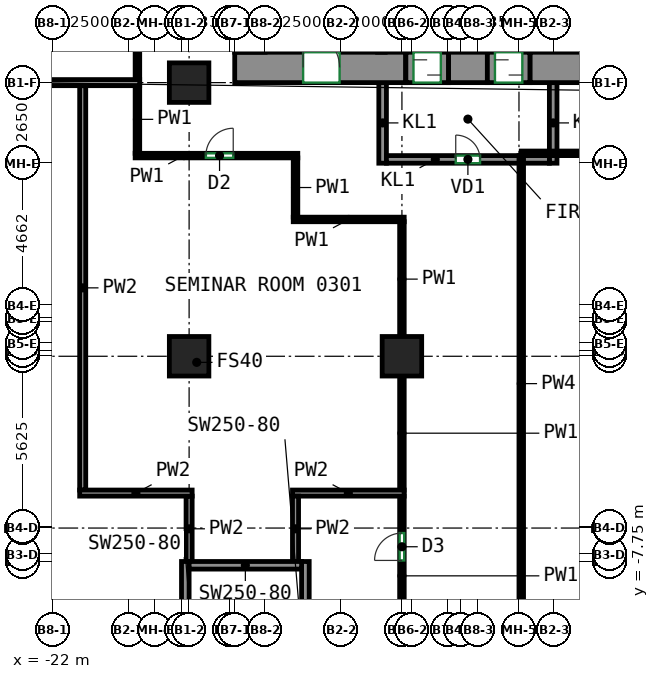
"""IFC4 building model, lengths in metres.
Left out: names, types, materials, properties, quantities, classifications, styles, units other than length and angle.
Written with IfcOpenShell. Run it as: python <this file> out.ifc"""

import sys

from ifc_helpers import new_model, si_unit, direction, frame, frame_2d, origin, origin_2d, place, context, subcontext, project, spatial, rectangle, extrude, source, transform, mapped, element, fill, save


model = new_model("IFC4")
c1 = context("Model", 3, precision=1e-05, world=origin(), true_north=direction((0.0, 1.0)))
c2 = subcontext(c1, "Body", "Model", "MODEL_VIEW")
j1 = project(units=[si_unit("LENGTHUNIT", "METRE"), si_unit("PLANEANGLEUNIT", "RADIAN")], contexts=[c1])
p1 = place(None, origin())
s1 = spatial("IfcSite", under=j1, at=p1, CompositionType="ELEMENT")
p2 = place(p1, origin())
s2 = spatial("IfcBuilding", under=s1, at=p2, CompositionType="ELEMENT")
p3 = place(p2, frame((0.0, 0.0, 18.0)))
s3 = spatial("IfcBuildingStorey", under=s2, at=p3, CompositionType="ELEMENT", Elevation=18.0)
m1 = source(origin(), c2, "Body", "SweptSolid", [
    extrude(rectangle(XDim=1.3, YDim=1.3, at=origin_2d()), origin(), (0.0, 0.0, 1.0), 4.1),
])
for number, where, z_axis, x_axis in (
    (1, (-17.5, -1.0, 0.0), (0.0, 0.0, 1.0), (1.0, 0.0, 0.0)),
    (2, (-17.5, 8.0, 0.0), (0.0, 0.0, 1.0), (1.0, 0.0, 0.0)),
    (3, (-10.5, -1.0, 0.0), (0.0, 0.0, 1.0), (1.0, 0.0, 0.0)),
):
    element("IfcColumn", number, at=place(p3, frame(where, z_axis=z_axis, x_axis=x_axis)), inside=s3, PredefinedType="COLUMN", context=c2, shape_type="MappedRepresentation", body=[
        mapped(m1, transform((0.0, 0.0, 0.0))),
    ])
m2 = source(origin(), c2, "Body", "SweptSolid", [
    extrude(rectangle(XDim=5.63, YDim=1.0, at=frame_2d((2.815, 0.0))), origin(), (0.0, 0.0, 1.0), 4.1),
])
p4 = place(p3, frame((-16.0, 8.5, 0.0), z_axis=(0.0, 0.0, 1.0), x_axis=(1.0, 0.0, 0.0)))
e4 = element("IfcWall", 4, at=p4, inside=s3, PredefinedType="SHEAR", context=c2, shape_type="MappedRepresentation", body=[
    mapped(m2, transform((0.0, 0.0, 0.0))),
])
p5 = place(p4, frame((2.25, 0.0, 0.0)))
e5 = element("IfcOpeningElement", 5, at=p5, cuts=e4, PredefinedType="OPENING", context=c2, shape_type="SweptSolid", body=[
    extrude(rectangle(XDim=1.2, YDim=2.1, at=frame_2d((0.6, 1.05))), frame((0.0, 0.51, 0.0), z_axis=(0.0, -1.0, 0.0), x_axis=(1.0, 0.0, 0.0)), (0.0, 0.0, 1.0), 1.02),
])
m3 = source(origin(), c2, "Body", "SweptSolid", [
    extrude(rectangle(XDim=1.28, YDim=1.0, at=frame_2d((0.64, 0.0))), origin(), (0.0, 0.0, 1.0), 4.1),
])
p6 = place(p3, frame((-8.97, 8.5, 0.0), z_axis=(0.0, 0.0, 1.0), x_axis=(1.0, 0.0, 0.0)))
e6 = element("IfcWall", 6, at=p6, inside=s3, PredefinedType="SHEAR", context=c2, shape_type="MappedRepresentation", body=[
    mapped(m3, transform((0.0, 0.0, 0.0))),
])
m4 = source(origin(), c2, "Body", "SweptSolid", [
    extrude(rectangle(XDim=14.18, YDim=1.0, at=frame_2d((7.09, 0.0))), origin(), (0.0, 0.0, 1.0), 4.1),
])
p7 = place(p3, frame((-6.29, 8.5, 0.0), z_axis=(0.0, 0.0, 1.0), x_axis=(1.0, 0.0, 0.0)))
e7 = element("IfcWall", 7, at=p7, inside=s3, PredefinedType="SHEAR", context=c2, shape_type="MappedRepresentation", body=[
    mapped(m4, transform((0.0, 0.0, 0.0))),
])
m5 = source(origin(), c2, "Body", "SweptSolid", [
    extrude(rectangle(XDim=8.0, YDim=0.25, at=frame_2d((4.0, 0.0))), origin(), (0.0, 0.0, 1.0), 4.1),
])
for number, where, z_axis, x_axis in (
    (8, (-17.625, -15.75, 0.0), (0.0, 0.0, 1.0), (0.0, 1.0, 0.0)),
    (9, (-13.675, -15.75, 0.0), (0.0, 0.0, 1.0), (0.0, 1.0, 0.0)),
):
    element("IfcWall", number, at=place(p3, frame(where, z_axis=z_axis, x_axis=x_axis)), inside=s3, PredefinedType="SHEAR", context=c2, shape_type="MappedRepresentation", body=[
        mapped(m5, transform((0.0, 0.0, 0.0))),
    ])
m6 = source(origin(), c2, "Body", "SweptSolid", [
    extrude(rectangle(XDim=3.7, YDim=0.25, at=frame_2d((1.85, 0.0))), origin(), (0.0, 0.0, 1.0), 4.1),
])
p8 = place(p3, frame((-17.5, -7.875, 0.0), z_axis=(0.0, 0.0, 1.0), x_axis=(1.0, 0.0, 0.0)))
e10 = element("IfcWall", 10, at=p8, inside=s3, PredefinedType="SHEAR", context=c2, shape_type="MappedRepresentation", body=[
    mapped(m6, transform((0.0, 0.0, 0.0))),
])
m7 = source(origin(), c2, "Body", "SweptSolid", [
    extrude(rectangle(XDim=1.4, YDim=1.0, at=frame_2d((0.7, 0.0))), origin(), (0.0, 0.0, 1.0), 0.2),
])
p9 = place(p3, frame((-10.37, 8.5, 3.9), z_axis=(0.0, 0.0, 1.0), x_axis=(1.0, 0.0, 0.0)))
e11 = element("IfcWall", 11, at=p9, inside=s3, PredefinedType="SHEAR", context=c2, shape_type="MappedRepresentation", body=[
    mapped(m7, transform((0.0, 0.0, 0.0))),
])
m8 = source(origin(), c2, "Body", "SweptSolid", [
    extrude(rectangle(XDim=2.65, YDim=0.25, at=frame_2d((1.325, 0.0))), origin(), (0.0, 0.0, 1.0), 4.1),
])
for number, where, z_axis, x_axis in (
    (12, (-11.135, 5.35, 0.0), (0.0, 0.0, 1.0), (0.0, 1.0, 0.0)),
    (13, (-5.525, 5.35, 0.0), (0.0, 0.0, 1.0), (0.0, 1.0, 0.0)),
):
    element("IfcWall", number, at=place(p3, frame(where, z_axis=z_axis, x_axis=x_axis)), inside=s3, PredefinedType="PARTITIONING", context=c2, shape_type="MappedRepresentation", body=[
        mapped(m8, transform((0.0, 0.0, 0.0))),
    ])
m9 = source(origin(), c2, "Body", "SweptSolid", [
    extrude(rectangle(XDim=5.36, YDim=0.25, at=frame_2d((2.68, 0.0))), origin(), (0.0, 0.0, 1.0), 4.1),
])
p10 = place(p3, frame((-11.01, 5.475, 0.0), z_axis=(0.0, 0.0, 1.0), x_axis=(1.0, 0.0, 0.0)))
e14 = element("IfcWall", 14, at=p10, inside=s3, PredefinedType="PARTITIONING", context=c2, shape_type="MappedRepresentation", body=[
    mapped(m9, transform((0.0, 0.0, 0.0))),
])
p11 = place(p10, frame((2.28, 0.0, 0.0)))
e15 = element("IfcOpeningElement", 15, at=p11, cuts=e14, PredefinedType="OPENING", context=c2, shape_type="SweptSolid", body=[
    extrude(rectangle(XDim=0.8, YDim=2.0, at=frame_2d((0.4, 1.0))), frame((0.0, 0.135, 0.0), z_axis=(0.0, -1.0, 0.0), x_axis=(1.0, 0.0, 0.0)), (0.0, 0.0, 1.0), 0.27),
])
m10 = source(origin(), c2, "Body", "SweptSolid", [
    extrude(rectangle(XDim=1.4, YDim=1.0, at=frame_2d((0.7, 0.0))), origin(), (0.0, 0.0, 1.0), 2.7),
])
p12 = place(p3, frame((-10.37, 8.5, 0.0), z_axis=(0.0, 0.0, 1.0), x_axis=(1.0, 0.0, 0.0)))
e16 = element("IfcWall", 16, at=p12, inside=s3, PredefinedType="PARTITIONING", context=c2, shape_type="MappedRepresentation", body=[
    mapped(m10, transform((0.0, 0.0, 0.0))),
])
p13 = place(p12, frame((0.25, 0.0, 0.0)))
e17 = element("IfcOpeningElement", 17, at=p13, cuts=e16, PredefinedType="OPENING", context=c2, shape_type="SweptSolid", body=[
    extrude(rectangle(XDim=0.9, YDim=2.1, at=frame_2d((0.45, 1.05))), frame((0.0, 0.51, 0.0), z_axis=(0.0, -1.0, 0.0), x_axis=(1.0, 0.0, 0.0)), (0.0, 0.0, 1.0), 1.02),
])
m11 = source(origin(), c2, "Body", "SweptSolid", [
    extrude(rectangle(XDim=1.4, YDim=1.0, at=frame_2d((0.7, 0.0))), origin(), (0.0, 0.0, 1.0), 2.7),
])
p14 = place(p3, frame((-7.69, 8.5, 0.0), z_axis=(0.0, 0.0, 1.0), x_axis=(1.0, 0.0, 0.0)))
e18 = element("IfcWall", 18, at=p14, inside=s3, PredefinedType="PARTITIONING", context=c2, shape_type="MappedRepresentation", body=[
    mapped(m11, transform((0.0, 0.0, 0.0))),
])
p15 = place(p14, frame((0.25, 0.0, 0.0)))
e19 = element("IfcOpeningElement", 19, at=p15, cuts=e18, PredefinedType="OPENING", context=c2, shape_type="SweptSolid", body=[
    extrude(rectangle(XDim=0.9, YDim=2.1, at=frame_2d((0.45, 1.05))), frame((0.0, 0.51, 0.0), z_axis=(0.0, -1.0, 0.0), x_axis=(1.0, 0.0, 0.0)), (0.0, 0.0, 1.0), 1.02),
])
p16 = place(p3, frame((-10.5, -5.41, 0.0), z_axis=(0.0, 0.0, 1.0), x_axis=(0.0, 1.0, 0.0)))
e20 = element("IfcWall", 20, at=p16, inside=s3, PredefinedType="PARTITIONING", context=c2, shape_type="SweptSolid", body=[
    extrude(rectangle(XDim=3.76, YDim=0.15, at=frame_2d((1.88, 0.0))), origin(), (0.0, 0.0, 1.0), 3.45),
])
p17 = place(p3, frame((-10.5, -0.35, 0.0), z_axis=(0.0, 0.0, 1.0), x_axis=(0.0, 1.0, 0.0)))
e21 = element("IfcWall", 21, at=p17, inside=s3, PredefinedType="PARTITIONING", context=c2, shape_type="SweptSolid", body=[
    extrude(rectangle(XDim=3.775, YDim=0.15, at=frame_2d((1.888, 0.0))), origin(), (0.0, 0.0, 1.0), 4.1),
])
p18 = place(p3, frame((-14.075, 3.5, 0.0), z_axis=(0.0, 0.0, 1.0), x_axis=(1.0, 0.0, 0.0)))
e22 = element("IfcWall", 22, at=p18, inside=s3, PredefinedType="PARTITIONING", context=c2, shape_type="SweptSolid", body=[
    extrude(rectangle(XDim=3.65, YDim=0.15, at=frame_2d((1.825, 0.0))), origin(), (0.0, 0.0, 1.0), 4.1),
])
p19 = place(p3, frame((-14.0, 5.525, 0.0), z_axis=(0.0, 0.0, 1.0), x_axis=(0.0, -1.0, 0.0)))
e23 = element("IfcWall", 23, at=p19, inside=s3, PredefinedType="PARTITIONING", context=c2, shape_type="SweptSolid", body=[
    extrude(rectangle(XDim=1.95, YDim=0.15, at=frame_2d((0.975, 0.0))), origin(), (0.0, 0.0, 1.0), 4.1),
])
p20 = place(p3, frame((-19.275, 5.6, 0.0), z_axis=(0.0, 0.0, 1.0), x_axis=(1.0, 0.0, 0.0)))
e24 = element("IfcWall", 24, at=p20, inside=s3, PredefinedType="PARTITIONING", context=c2, shape_type="SweptSolid", body=[
    extrude(rectangle(XDim=5.35, YDim=0.15, at=frame_2d((2.675, 0.0))), origin(), (0.0, 0.0, 1.0), 4.1),
])
p21 = place(p20, frame((2.326, 0.0, 0.0)))
e25 = element("IfcOpeningElement", 25, at=p21, cuts=e24, PredefinedType="OPENING", context=c2, shape_type="SweptSolid", body=[
    extrude(rectangle(XDim=0.9, YDim=2.1, at=frame_2d((0.45, 1.05))), frame((0.0, 0.085, 0.0), z_axis=(0.0, -1.0, 0.0), x_axis=(1.0, 0.0, 0.0)), (0.0, 0.0, 1.0), 0.17),
])
p22 = place(p3, frame((-19.2, 5.675, 0.0), z_axis=(0.0, 0.0, 1.0), x_axis=(0.0, 1.0, 0.0)))
e26 = element("IfcWall", 26, at=p22, inside=s3, PredefinedType="PARTITIONING", context=c2, shape_type="SweptSolid", body=[
    extrude(rectangle(XDim=2.235, YDim=0.15, at=frame_2d((1.117, 0.0))), origin(), (0.0, 0.0, 1.0), 4.1),
])
p23 = place(p3, frame((-10.5, -9.35, 0.0), z_axis=(0.0, 0.0, 1.0), x_axis=(0.0, 1.0, 0.0)))
e27 = element("IfcWall", 27, at=p23, inside=s3, PredefinedType="PARTITIONING", context=c2, shape_type="SweptSolid", body=[
    extrude(rectangle(XDim=3.76, YDim=0.15, at=frame_2d((1.88, 0.0))), origin(), (0.0, 0.0, 1.0), 3.45),
])
p24 = place(p23, frame((1.635, 0.0, 0.0)))
e28 = element("IfcOpeningElement", 28, at=p24, cuts=e27, PredefinedType="OPENING", context=c2, shape_type="SweptSolid", body=[
    extrude(rectangle(XDim=0.9, YDim=2.1, at=frame_2d((0.45, 1.05))), frame((0.0, 0.085, 0.0), z_axis=(0.0, -1.0, 0.0), x_axis=(1.0, 0.0, 0.0)), (0.0, 0.0, 1.0), 0.17),
])
p25 = place(p3, frame((-19.2, 8.09, 0.0), z_axis=(0.0, 0.0, 1.0), x_axis=(0.0, 1.0, 0.0)))
e29 = element("IfcWall", 29, at=p25, inside=s3, PredefinedType="PARTITIONING", context=c2, shape_type="SweptSolid", body=[
    extrude(rectangle(XDim=16.335, YDim=0.15, at=frame_2d((8.167, 0.0))), origin(), (0.0, 0.0, 1.0), 4.1),
])
p26 = place(p25, frame((8.72, 0.0, 0.0)))
e30 = element("IfcOpeningElement", 30, at=p26, cuts=e29, PredefinedType="OPENING", context=c2, shape_type="SweptSolid", body=[
    extrude(rectangle(XDim=0.9, YDim=2.1, at=frame_2d((0.45, 1.05))), frame((0.0, 0.085, 0.0), z_axis=(0.0, -1.0, 0.0), x_axis=(1.0, 0.0, 0.0)), (0.0, 0.0, 1.0), 0.17),
])
p27 = place(p3, frame((-21.0, 7.9, 0.0), z_axis=(0.0, 0.0, 1.0), x_axis=(0.0, -1.0, 0.0)))
e31 = element("IfcWall", 31, at=p27, inside=s3, PredefinedType="PARTITIONING", context=c2, shape_type="SweptSolid", body=[
    extrude(rectangle(XDim=13.3, YDim=0.2, at=frame_2d((6.65, 0.0))), origin(), (0.0, 0.0, 1.0), 4.1),
])
p28 = place(p3, frame((-17.5, -7.75, 0.0), z_axis=(0.0, 0.0, 1.0), x_axis=(0.0, 1.0, 0.0)))
e32 = element("IfcWall", 32, at=p28, inside=s3, PredefinedType="PARTITIONING", context=c2, shape_type="SweptSolid", body=[
    extrude(rectangle(XDim=2.15, YDim=0.2, at=frame_2d((1.075, 0.0))), origin(), (0.0, 0.0, 1.0), 4.1),
])
p29 = place(p3, frame((-21.1, -5.5, 0.0), z_axis=(0.0, 0.0, 1.0), x_axis=(1.0, 0.0, 0.0)))
e33 = element("IfcWall", 33, at=p29, inside=s3, PredefinedType="PARTITIONING", context=c2, shape_type="SweptSolid", body=[
    extrude(rectangle(XDim=3.7, YDim=0.2, at=frame_2d((1.85, 0.0))), origin(), (0.0, 0.0, 1.0), 4.1),
])
p30 = place(p3, frame((-14.1, -5.5, 0.0), z_axis=(0.0, 0.0, 1.0), x_axis=(1.0, 0.0, 0.0)))
e34 = element("IfcWall", 34, at=p30, inside=s3, PredefinedType="PARTITIONING", context=c2, shape_type="SweptSolid", body=[
    extrude(rectangle(XDim=3.674, YDim=0.2, at=frame_2d((1.837, 0.0))), origin(), (0.0, 0.0, 1.0), 4.1),
])
p31 = place(p3, frame((-14.0, -7.75, 0.0), z_axis=(0.0, 0.0, 1.0), x_axis=(0.0, 1.0, 0.0)))
e35 = element("IfcWall", 35, at=p31, inside=s3, PredefinedType="PARTITIONING", context=c2, shape_type="SweptSolid", body=[
    extrude(rectangle(XDim=2.15, YDim=0.2, at=frame_2d((1.075, 0.0))), origin(), (0.0, 0.0, 1.0), 4.1),
])
p32 = place(p3, frame((-27.1, 8.0, 0.0), z_axis=(0.0, 0.0, 1.0), x_axis=(1.0, 0.0, 0.0)))
e36 = element("IfcWall", 36, at=p32, inside=s3, PredefinedType="PARTITIONING", context=c2, shape_type="SweptSolid", body=[
    extrude(rectangle(XDim=7.974, YDim=0.2, at=frame_2d((3.987, 0.0))), origin(), (0.0, 0.0, 1.0), 3.45),
])
p33 = place(p3, frame((-6.575, -9.4, 0.0), z_axis=(0.0, 0.0, 1.0), x_axis=(0.0, 1.0, 0.0)))
e37 = element("IfcWall", 37, at=p33, inside=s3, PredefinedType="PARTITIONING", context=c2, shape_type="SweptSolid", body=[
    extrude(rectangle(XDim=15.0, YDim=0.15, at=frame_2d((7.5, 0.0))), origin(), (0.0, 0.0, 1.0), 4.1),
])
p34 = place(p3, frame((-6.575, 5.675, 0.0), z_axis=(0.0, 0.0, 1.0), x_axis=(1.0, 0.0, 0.0)))
e38 = element("IfcWall", 38, at=p34, inside=s3, PredefinedType="PARTITIONING", context=c2, shape_type="SweptSolid", body=[
    extrude(rectangle(XDim=15.075, YDim=0.15, at=frame_2d((7.538, 0.0))), origin(), (0.0, 0.0, 1.0), 4.1),
])
p35 = place(p11, origin())
e39 = element("IfcDoor", 39, at=p35, inside=s3, OperationType="SINGLE_SWING_LEFT", PredefinedType="DOOR", context=c2, shape_type="SweptSolid", body=[
    extrude(rectangle(XDim=0.8, YDim=2.0, at=frame_2d((0.4, 1.0))), frame((0.0, 0.025, 0.0), z_axis=(0.0, -1.0, 0.0), x_axis=(1.0, 0.0, 0.0)), (0.0, 0.0, 1.0), 0.05),
])
fill(e15, e39)
p36 = place(p13, origin())
e40 = element("IfcDoor", 40, at=p36, inside=s3, OperationType="SLIDING_TO_LEFT", PredefinedType="DOOR", context=c2, shape_type="SweptSolid", body=[
    extrude(rectangle(XDim=0.9, YDim=2.1, at=frame_2d((0.45, 1.05))), frame((0.0, 0.405, 0.0), z_axis=(0.0, -1.0, 0.0), x_axis=(1.0, 0.0, 0.0)), (0.0, 0.0, 1.0), 0.05),
])
fill(e17, e40)
p37 = place(p15, origin())
e41 = element("IfcDoor", 41, at=p37, inside=s3, OperationType="SLIDING_TO_RIGHT", PredefinedType="DOOR", context=c2, shape_type="SweptSolid", body=[
    extrude(rectangle(XDim=0.9, YDim=2.1, at=frame_2d((0.45, 1.05))), frame((0.0, 0.405, 0.0), z_axis=(0.0, -1.0, 0.0), x_axis=(1.0, 0.0, 0.0)), (0.0, 0.0, 1.0), 0.05),
])
fill(e19, e41)
p38 = place(p5, origin())
e42 = element("IfcDoor", 42, at=p38, inside=s3, OperationType="DOUBLE_DOOR_SINGLE_SWING", PredefinedType="DOOR", context=c2, shape_type="SweptSolid", body=[
    extrude(rectangle(XDim=1.2, YDim=2.1, at=frame_2d((0.6, 1.05))), frame((0.0, 0.405, 0.0), z_axis=(0.0, -1.0, 0.0), x_axis=(1.0, 0.0, 0.0)), (0.0, 0.0, 1.0), 0.05),
])
fill(e5, e42)
p39 = place(p24, origin())
e43 = element("IfcDoor", 43, at=p39, inside=s3, OperationType="SINGLE_SWING_LEFT", PredefinedType="DOOR", context=c2, shape_type="SweptSolid", body=[
    extrude(rectangle(XDim=0.9, YDim=2.1, at=frame_2d((0.45, 1.05))), frame((0.0, 0.025, 0.0), z_axis=(0.0, -1.0, 0.0), x_axis=(1.0, 0.0, 0.0)), (0.0, 0.0, 1.0), 0.05),
])
fill(e28, e43)
p40 = place(p21, origin())
e44 = element("IfcDoor", 44, at=p40, inside=s3, OperationType="SINGLE_SWING_RIGHT", PredefinedType="DOOR", context=c2, shape_type="SweptSolid", body=[
    extrude(rectangle(XDim=0.9, YDim=2.1, at=frame_2d((0.45, 1.05))), frame((0.0, 0.025, 0.0), z_axis=(0.0, -1.0, 0.0), x_axis=(1.0, 0.0, 0.0)), (0.0, 0.0, 1.0), 0.05),
])
fill(e25, e44)
save(model, sys.argv[1])
